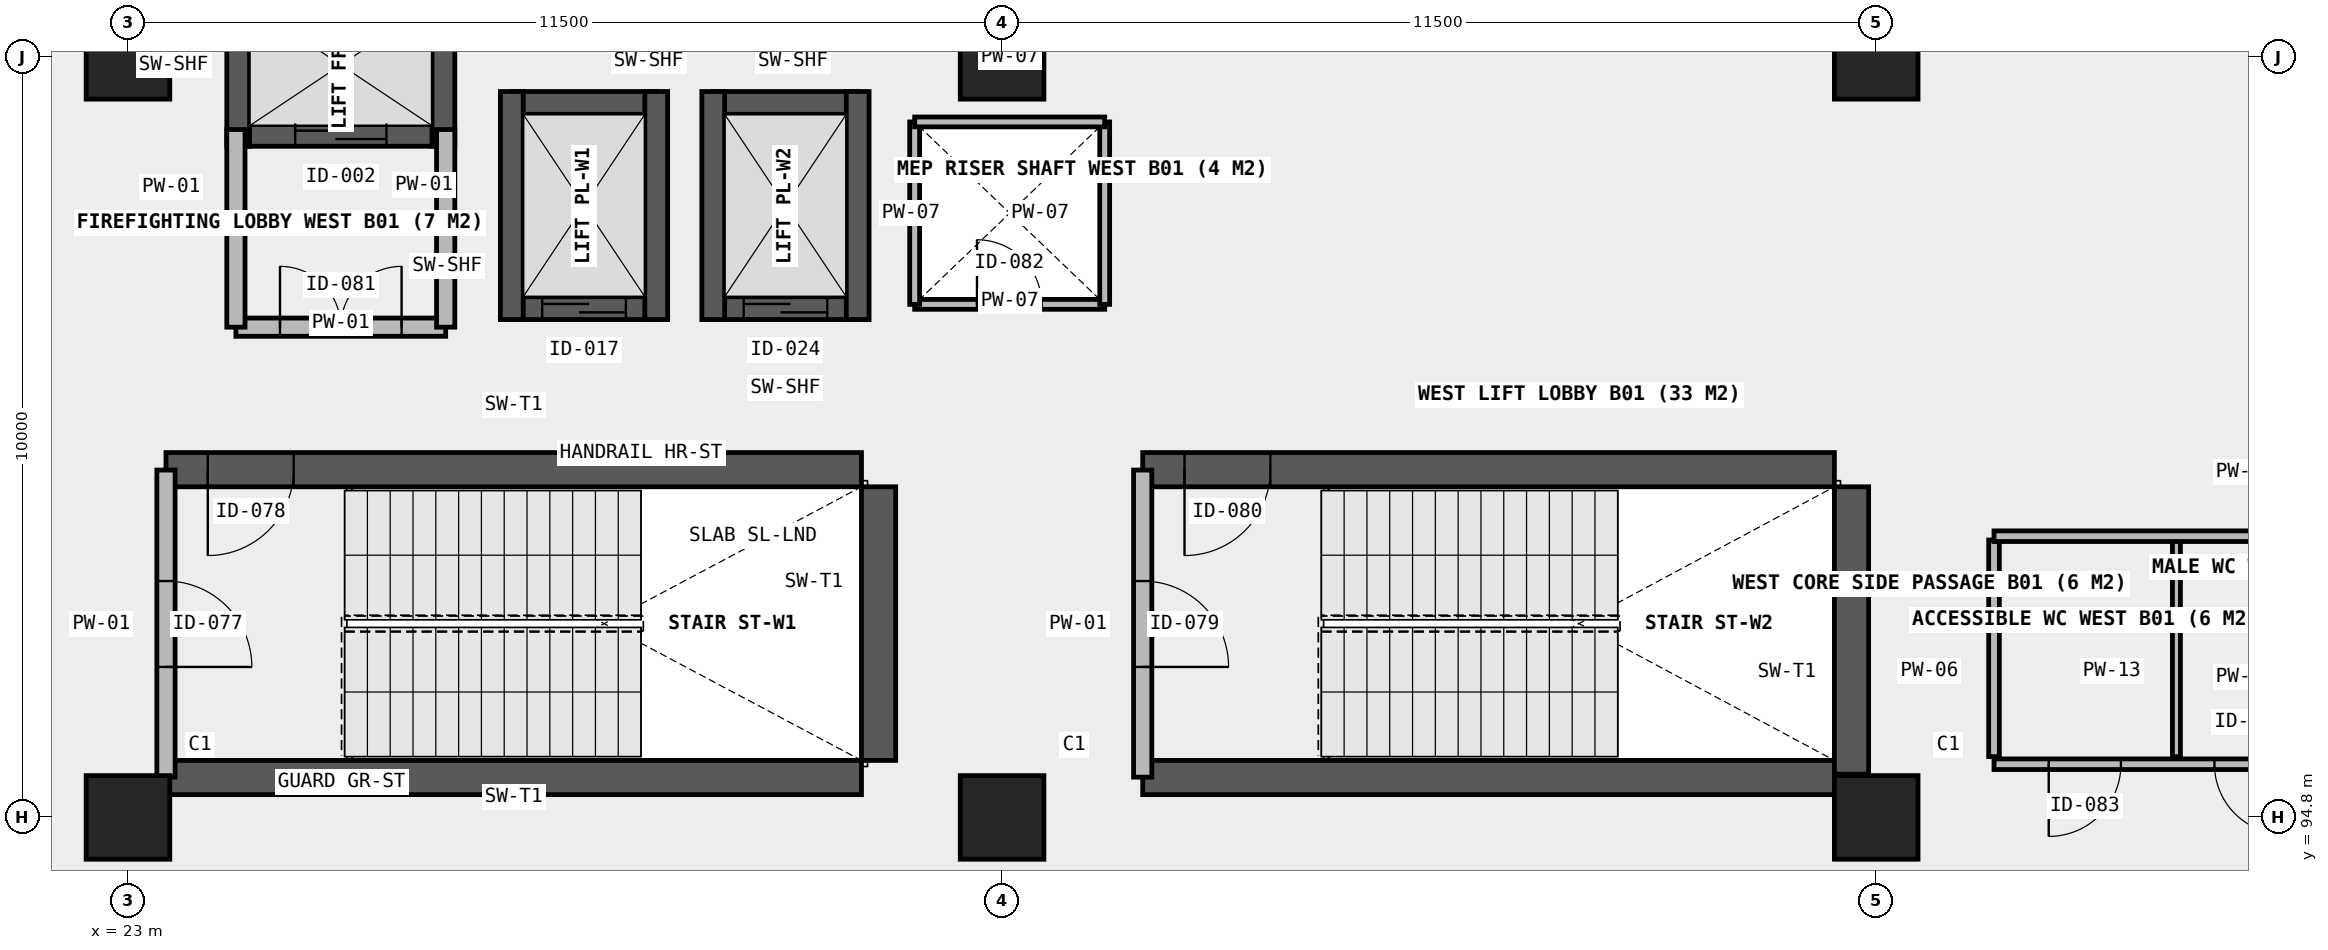
"""IFC4 building model, lengths in metres.
Left out: names, types, materials, properties, quantities, classifications, styles, units other than length and angle.
Written with IfcOpenShell. Run it as: python <this file> out.ifc"""

import sys

from ifc_helpers import new_model, si_unit, direction, frame, frame_2d, origin, origin_2d, place, context, subcontext, project, spatial, rectangle, extrude, element, fill, save


model = new_model("IFC4")
c1 = context("Model", 3, precision=1e-05, world=origin(), true_north=direction((0.0, 1.0)))
c2 = subcontext(c1, "Body", "Model", "MODEL_VIEW")
j1 = project(units=[si_unit("LENGTHUNIT", "METRE"), si_unit("PLANEANGLEUNIT", "RADIAN")], contexts=[c1])
p1 = place(None, origin())
s1 = spatial("IfcSite", under=j1, at=p1, CompositionType="ELEMENT")
p2 = place(p1, origin())
s2 = spatial("IfcBuilding", under=s1, at=p2, CompositionType="ELEMENT")
p3 = place(p2, frame((0.0, 0.0, -4.2)))
s3 = spatial("IfcBuildingStorey", under=s2, at=p3, CompositionType="ELEMENT", Elevation=-4.2)
for number, where, z_axis, x_axis in (
    (1, (23.0, 94.8, 0.0), (0.0, 0.0, 1.0), (1.0, 0.0, 0.0)),
    (2, (23.0, 104.8, 0.0), (0.0, 0.0, 1.0), (1.0, 0.0, 0.0)),
    (3, (34.5, 94.8, 0.0), (0.0, 0.0, 1.0), (1.0, 0.0, 0.0)),
    (4, (34.5, 104.8, 0.0), (0.0, 0.0, 1.0), (1.0, 0.0, 0.0)),
    (5, (46.0, 94.8, 0.0), (0.0, 0.0, 1.0), (1.0, 0.0, 0.0)),
    (6, (46.0, 104.8, 0.0), (0.0, 0.0, 1.0), (1.0, 0.0, 0.0)),
):
    element("IfcColumn", number, at=place(p3, frame(where, z_axis=z_axis, x_axis=x_axis)), inside=s3, PredefinedType="COLUMN", context=c2, shape_type="SweptSolid", body=[
        extrude(rectangle(XDim=1.1, YDim=1.1, at=origin_2d()), origin(), (0.0, 0.0, 1.0), 4.2),
    ])
p4 = place(p3, frame((24.45, 103.78, 0.0), z_axis=(0.0, 0.0, 1.0), x_axis=(1.0, 0.0, 0.0)))
e7 = element("IfcWall", 7, at=p4, inside=s3, PredefinedType="SHEAR", context=c2, shape_type="SweptSolid", body=[
    extrude(rectangle(XDim=2.7, YDim=0.3, at=frame_2d((1.35, 0.0))), origin(), (0.0, 0.0, 1.0), 4.2),
])
p5 = place(p4, frame((0.75, 0.0, 0.0)))
e8 = element("IfcOpeningElement", 8, at=p5, cuts=e7, PredefinedType="OPENING", context=c2, shape_type="SweptSolid", body=[
    extrude(rectangle(XDim=1.2, YDim=2.15, at=frame_2d((0.6, 1.075))), frame((0.0, 0.16, 0.0), z_axis=(0.0, -1.0, 0.0), x_axis=(1.0, 0.0, 0.0)), (0.0, 0.0, 1.0), 0.32),
])
for number, where, z_axis, x_axis in (
    (9, (24.45, 103.63, 0.0), (0.0, 0.0, 1.0), (0.0, 1.0, 0.0)),
    (10, (27.15, 103.63, 0.0), (0.0, 0.0, 1.0), (0.0, 1.0, 0.0)),
):
    element("IfcWall", number, at=place(p3, frame(where, z_axis=z_axis, x_axis=x_axis)), inside=s3, PredefinedType="SHEAR", context=c2, shape_type="SweptSolid", body=[
        extrude(rectangle(XDim=2.14, YDim=0.3, at=frame_2d((1.07, 0.0))), origin(), (0.0, 0.0, 1.0), 4.2),
    ])
p6 = place(p3, frame((28.05, 101.5, 0.0), z_axis=(0.0, 0.0, 1.0), x_axis=(1.0, 0.0, 0.0)))
e11 = element("IfcWall", 11, at=p6, inside=s3, PredefinedType="SHEAR", context=c2, shape_type="SweptSolid", body=[
    extrude(rectangle(XDim=1.9, YDim=0.3, at=frame_2d((0.95, 0.0))), origin(), (0.0, 0.0, 1.0), 4.2),
])
p7 = place(p6, frame((0.4, 0.0, 0.0)))
e12 = element("IfcOpeningElement", 12, at=p7, cuts=e11, PredefinedType="OPENING", context=c2, shape_type="SweptSolid", body=[
    extrude(rectangle(XDim=1.1, YDim=2.15, at=frame_2d((0.55, 1.075))), frame((0.0, 0.16, 0.0), z_axis=(0.0, -1.0, 0.0), x_axis=(1.0, 0.0, 0.0)), (0.0, 0.0, 1.0), 0.32),
])
p8 = place(p3, frame((28.05, 104.2, 0.0), z_axis=(0.0, 0.0, 1.0), x_axis=(1.0, 0.0, 0.0)))
e13 = element("IfcWall", 13, at=p8, inside=s3, PredefinedType="SHEAR", context=c2, shape_type="SweptSolid", body=[
    extrude(rectangle(XDim=1.9, YDim=0.3, at=frame_2d((0.95, 0.0))), origin(), (0.0, 0.0, 1.0), 4.2),
])
for number, where, z_axis, x_axis in (
    (14, (28.05, 101.35, 0.0), (0.0, 0.0, 1.0), (0.0, 1.0, 0.0)),
    (15, (29.95, 101.35, 0.0), (0.0, 0.0, 1.0), (0.0, 1.0, 0.0)),
):
    element("IfcWall", number, at=place(p3, frame(where, z_axis=z_axis, x_axis=x_axis)), inside=s3, PredefinedType="SHEAR", context=c2, shape_type="SweptSolid", body=[
        extrude(rectangle(XDim=3.0, YDim=0.3, at=frame_2d((1.5, 0.0))), origin(), (0.0, 0.0, 1.0), 4.2),
    ])
p9 = place(p3, frame((30.7, 101.5, 0.0), z_axis=(0.0, 0.0, 1.0), x_axis=(1.0, 0.0, 0.0)))
e16 = element("IfcWall", 16, at=p9, inside=s3, PredefinedType="SHEAR", context=c2, shape_type="SweptSolid", body=[
    extrude(rectangle(XDim=1.9, YDim=0.3, at=frame_2d((0.95, 0.0))), origin(), (0.0, 0.0, 1.0), 4.2),
])
p10 = place(p9, frame((0.4, 0.0, 0.0)))
e17 = element("IfcOpeningElement", 17, at=p10, cuts=e16, PredefinedType="OPENING", context=c2, shape_type="SweptSolid", body=[
    extrude(rectangle(XDim=1.1, YDim=2.15, at=frame_2d((0.55, 1.075))), frame((0.0, 0.16, 0.0), z_axis=(0.0, -1.0, 0.0), x_axis=(1.0, 0.0, 0.0)), (0.0, 0.0, 1.0), 0.32),
])
p11 = place(p3, frame((30.7, 104.2, 0.0), z_axis=(0.0, 0.0, 1.0), x_axis=(1.0, 0.0, 0.0)))
e18 = element("IfcWall", 18, at=p11, inside=s3, PredefinedType="SHEAR", context=c2, shape_type="SweptSolid", body=[
    extrude(rectangle(XDim=1.9, YDim=0.3, at=frame_2d((0.95, 0.0))), origin(), (0.0, 0.0, 1.0), 4.2),
])
for number, where, z_axis, x_axis in (
    (19, (30.7, 101.35, 0.0), (0.0, 0.0, 1.0), (0.0, 1.0, 0.0)),
    (20, (32.6, 101.35, 0.0), (0.0, 0.0, 1.0), (0.0, 1.0, 0.0)),
):
    element("IfcWall", number, at=place(p3, frame(where, z_axis=z_axis, x_axis=x_axis)), inside=s3, PredefinedType="SHEAR", context=c2, shape_type="SweptSolid", body=[
        extrude(rectangle(XDim=3.0, YDim=0.3, at=frame_2d((1.5, 0.0))), origin(), (0.0, 0.0, 1.0), 4.2),
    ])
p12 = place(p3, frame((23.5, 95.325, 0.0), z_axis=(0.0, 0.0, 1.0), x_axis=(1.0, 0.0, 0.0)))
e21 = element("IfcWall", 21, at=p12, inside=s3, PredefinedType="SHEAR", context=c2, shape_type="SweptSolid", body=[
    extrude(rectangle(XDim=9.15, YDim=0.45, at=frame_2d((4.575, 0.0))), origin(), (0.0, 0.0, 1.0), 4.2),
])
p13 = place(p3, frame((23.5, 99.375, 0.0), z_axis=(0.0, 0.0, 1.0), x_axis=(1.0, 0.0, 0.0)))
e22 = element("IfcWall", 22, at=p13, inside=s3, PredefinedType="SHEAR", context=c2, shape_type="SweptSolid", body=[
    extrude(rectangle(XDim=9.15, YDim=0.45, at=frame_2d((4.575, 0.0))), origin(), (0.0, 0.0, 1.0), 4.2),
])
p14 = place(p13, frame((0.55, 0.0, 0.0)))
e23 = element("IfcOpeningElement", 23, at=p14, cuts=e22, PredefinedType="OPENING", context=c2, shape_type="SweptSolid", body=[
    extrude(rectangle(XDim=1.13, YDim=2.15, at=frame_2d((0.565, 1.075))), frame((0.0, 0.235, 0.0), z_axis=(0.0, -1.0, 0.0), x_axis=(1.0, 0.0, 0.0)), (0.0, 0.0, 1.0), 0.47),
])
p15 = place(p3, frame((32.875, 95.55, 0.0), z_axis=(0.0, 0.0, 1.0), x_axis=(0.0, 1.0, 0.0)))
e24 = element("IfcWall", 24, at=p15, inside=s3, PredefinedType="SHEAR", context=c2, shape_type="SweptSolid", body=[
    extrude(rectangle(XDim=3.6, YDim=0.45, at=frame_2d((1.8, 0.0))), origin(), (0.0, 0.0, 1.0), 4.2),
])
p16 = place(p3, frame((36.35, 95.325, 0.0), z_axis=(0.0, 0.0, 1.0), x_axis=(1.0, 0.0, 0.0)))
e25 = element("IfcWall", 25, at=p16, inside=s3, PredefinedType="SHEAR", context=c2, shape_type="SweptSolid", body=[
    extrude(rectangle(XDim=9.1, YDim=0.45, at=frame_2d((4.55, 0.0))), origin(), (0.0, 0.0, 1.0), 4.2),
])
p17 = place(p3, frame((36.35, 99.375, 0.0), z_axis=(0.0, 0.0, 1.0), x_axis=(1.0, 0.0, 0.0)))
e26 = element("IfcWall", 26, at=p17, inside=s3, PredefinedType="SHEAR", context=c2, shape_type="SweptSolid", body=[
    extrude(rectangle(XDim=9.1, YDim=0.45, at=frame_2d((4.55, 0.0))), origin(), (0.0, 0.0, 1.0), 4.2),
])
p18 = place(p17, frame((0.55, 0.0, 0.0)))
e27 = element("IfcOpeningElement", 27, at=p18, cuts=e26, PredefinedType="OPENING", context=c2, shape_type="SweptSolid", body=[
    extrude(rectangle(XDim=1.13, YDim=2.15, at=frame_2d((0.565, 1.075))), frame((0.0, 0.235, 0.0), z_axis=(0.0, -1.0, 0.0), x_axis=(1.0, 0.0, 0.0)), (0.0, 0.0, 1.0), 0.47),
])
p19 = place(p3, frame((45.675, 95.37, 0.0), z_axis=(0.0, 0.0, 1.0), x_axis=(0.0, 1.0, 0.0)))
e28 = element("IfcWall", 28, at=p19, inside=s3, PredefinedType="SHEAR", context=c2, shape_type="SweptSolid", body=[
    extrude(rectangle(XDim=3.78, YDim=0.45, at=frame_2d((1.89, 0.0))), origin(), (0.0, 0.0, 1.0), 4.2),
])
p20 = place(p3, frame((23.5, 95.33, 0.0), z_axis=(0.0, 0.0, 1.0), x_axis=(0.0, 1.0, 0.0)))
e29 = element("IfcWall", 29, at=p20, inside=s3, PredefinedType="SOLIDWALL", context=c2, shape_type="SweptSolid", body=[
    extrude(rectangle(XDim=4.04, YDim=0.24, at=frame_2d((2.02, 0.0))), origin(), (0.0, 0.0, 1.0), 3.86),
])
p21 = place(p20, frame((1.45, 0.0, 0.0)))
e30 = element("IfcOpeningElement", 30, at=p21, cuts=e29, PredefinedType="OPENING", context=c2, shape_type="SweptSolid", body=[
    extrude(rectangle(XDim=1.13, YDim=2.15, at=frame_2d((0.565, 1.075))), frame((0.0, 0.13, 0.0), z_axis=(0.0, -1.0, 0.0), x_axis=(1.0, 0.0, 0.0)), (0.0, 0.0, 1.0), 0.26),
])
p22 = place(p3, frame((36.35, 95.33, 0.0), z_axis=(0.0, 0.0, 1.0), x_axis=(0.0, 1.0, 0.0)))
e31 = element("IfcWall", 31, at=p22, inside=s3, PredefinedType="SOLIDWALL", context=c2, shape_type="SweptSolid", body=[
    extrude(rectangle(XDim=4.04, YDim=0.24, at=frame_2d((2.02, 0.0))), origin(), (0.0, 0.0, 1.0), 3.86),
])
p23 = place(p22, frame((1.45, 0.0, 0.0)))
e32 = element("IfcOpeningElement", 32, at=p23, cuts=e31, PredefinedType="OPENING", context=c2, shape_type="SweptSolid", body=[
    extrude(rectangle(XDim=1.13, YDim=2.15, at=frame_2d((0.565, 1.075))), frame((0.0, 0.13, 0.0), z_axis=(0.0, -1.0, 0.0), x_axis=(1.0, 0.0, 0.0)), (0.0, 0.0, 1.0), 0.26),
])
p24 = place(p3, frame((24.42, 101.25, 0.0), z_axis=(0.0, 0.0, 1.0), x_axis=(1.0, 0.0, 0.0)))
e33 = element("IfcWall", 33, at=p24, inside=s3, PredefinedType="SOLIDWALL", context=c2, shape_type="SweptSolid", body=[
    extrude(rectangle(XDim=2.76, YDim=0.24, at=frame_2d((1.38, 0.0))), origin(), (0.0, 0.0, 1.0), 3.86),
])
p25 = place(p24, frame((0.58, 0.0, 0.0)))
e34 = element("IfcOpeningElement", 34, at=p25, cuts=e33, PredefinedType="OPENING", context=c2, shape_type="SweptSolid", body=[
    extrude(rectangle(XDim=1.6, YDim=2.15, at=frame_2d((0.8, 1.075))), frame((0.0, 0.13, 0.0), z_axis=(0.0, -1.0, 0.0), x_axis=(1.0, 0.0, 0.0)), (0.0, 0.0, 1.0), 0.26),
])
for number, where, z_axis, x_axis in (
    (35, (24.42, 101.25, 0.0), (0.0, 0.0, 1.0), (0.0, 1.0, 0.0)),
    (36, (27.18, 101.25, 0.0), (0.0, 0.0, 1.0), (0.0, 1.0, 0.0)),
):
    element("IfcWall", number, at=place(p3, frame(where, z_axis=z_axis, x_axis=x_axis)), inside=s3, PredefinedType="SOLIDWALL", context=c2, shape_type="SweptSolid", body=[
        extrude(rectangle(XDim=2.6, YDim=0.24, at=frame_2d((1.3, 0.0))), origin(), (0.0, 0.0, 1.0), 3.86),
    ])
p26 = place(p3, frame((33.35, 101.55, 0.0), z_axis=(0.0, 0.0, 1.0), x_axis=(1.0, 0.0, 0.0)))
e37 = element("IfcWall", 37, at=p26, inside=s3, PredefinedType="PLUMBINGWALL", context=c2, shape_type="SweptSolid", body=[
    extrude(rectangle(XDim=2.5, YDim=0.13, at=frame_2d((1.25, 0.0))), origin(), (0.0, 0.0, 1.0), 3.86),
])
p27 = place(p26, frame((0.82, 0.0, 0.0)))
e38 = element("IfcOpeningElement", 38, at=p27, cuts=e37, PredefinedType="OPENING", context=c2, shape_type="SweptSolid", body=[
    extrude(rectangle(XDim=0.85, YDim=2.0, at=frame_2d((0.425, 1.0))), frame((0.0, 0.075, 0.0), z_axis=(0.0, -1.0, 0.0), x_axis=(1.0, 0.0, 0.0)), (0.0, 0.0, 1.0), 0.15),
])
for number, where, z_axis, x_axis in (
    (39, (33.35, 101.55, 0.0), (0.0, 0.0, 1.0), (0.0, 1.0, 0.0)),
    (40, (35.85, 101.55, 0.0), (0.0, 0.0, 1.0), (0.0, 1.0, 0.0)),
):
    element("IfcWall", number, at=place(p3, frame(where, z_axis=z_axis, x_axis=x_axis)), inside=s3, PredefinedType="PLUMBINGWALL", context=c2, shape_type="SweptSolid", body=[
        extrude(rectangle(XDim=2.4, YDim=0.13, at=frame_2d((1.2, 0.0))), origin(), (0.0, 0.0, 1.0), 3.86),
    ])
p28 = place(p3, frame((33.35, 103.95, 0.0), z_axis=(0.0, 0.0, 1.0), x_axis=(1.0, 0.0, 0.0)))
e41 = element("IfcWall", 41, at=p28, inside=s3, PredefinedType="PLUMBINGWALL", context=c2, shape_type="SweptSolid", body=[
    extrude(rectangle(XDim=2.5, YDim=0.13, at=frame_2d((1.25, 0.0))), origin(), (0.0, 0.0, 1.0), 3.86),
])
p29 = place(p3, frame((47.55, 95.5, 0.0), z_axis=(0.0, 0.0, 1.0), x_axis=(1.0, 0.0, 0.0)))
e42 = element("IfcWall", 42, at=p29, inside=s3, PredefinedType="PLUMBINGWALL", context=c2, shape_type="SweptSolid", body=[
    extrude(rectangle(XDim=6.6, YDim=0.14, at=frame_2d((3.3, 0.0))), origin(), (0.0, 0.0, 1.0), 3.86),
])
p30 = place(p29, frame((0.72, 0.0, 0.0)))
e43 = element("IfcOpeningElement", 43, at=p30, cuts=e42, PredefinedType="OPENING", context=c2, shape_type="SweptSolid", body=[
    extrude(rectangle(XDim=0.95, YDim=2.1, at=frame_2d((0.475, 1.05))), frame((0.0, 0.08, 0.0), z_axis=(0.0, -1.0, 0.0), x_axis=(1.0, 0.0, 0.0)), (0.0, 0.0, 1.0), 0.16),
])
p31 = place(p29, frame((2.9, 0.0, 0.0)))
e44 = element("IfcOpeningElement", 44, at=p31, cuts=e42, PredefinedType="OPENING", context=c2, shape_type="SweptSolid", body=[
    extrude(rectangle(XDim=0.92, YDim=2.1, at=frame_2d((0.46, 1.05))), frame((0.0, 0.08, 0.0), z_axis=(0.0, -1.0, 0.0), x_axis=(1.0, 0.0, 0.0)), (0.0, 0.0, 1.0), 0.16),
])
p32 = place(p29, frame((5.0, 0.0, 0.0)))
e45 = element("IfcOpeningElement", 45, at=p32, cuts=e42, PredefinedType="OPENING", context=c2, shape_type="SweptSolid", body=[
    extrude(rectangle(XDim=0.92, YDim=2.1, at=frame_2d((0.46, 1.05))), frame((0.0, 0.08, 0.0), z_axis=(0.0, -1.0, 0.0), x_axis=(1.0, 0.0, 0.0)), (0.0, 0.0, 1.0), 0.16),
])
p33 = place(p3, frame((47.55, 95.6, 0.0), z_axis=(0.0, 0.0, 1.0), x_axis=(0.0, 1.0, 0.0)))
e46 = element("IfcWall", 46, at=p33, inside=s3, PredefinedType="PLUMBINGWALL", context=c2, shape_type="SweptSolid", body=[
    extrude(rectangle(XDim=2.85, YDim=0.14, at=frame_2d((1.425, 0.0))), origin(), (0.0, 0.0, 1.0), 3.86),
])
p34 = place(p3, frame((49.95, 95.6, 0.0), z_axis=(0.0, 0.0, 1.0), x_axis=(0.0, 1.0, 0.0)))
e47 = element("IfcWall", 47, at=p34, inside=s3, PredefinedType="PARTITIONING", context=c2, shape_type="SweptSolid", body=[
    extrude(rectangle(XDim=2.85, YDim=0.105, at=frame_2d((1.425, 0.0))), origin(), (0.0, 0.0, 1.0), 3.33),
])
p35 = place(p3, frame((47.55, 98.5, 0.0), z_axis=(0.0, 0.0, 1.0), x_axis=(1.0, 0.0, 0.0)))
e48 = element("IfcWall", 48, at=p35, inside=s3, PredefinedType="PLUMBINGWALL", context=c2, shape_type="SweptSolid", body=[
    extrude(rectangle(XDim=6.6, YDim=0.14, at=frame_2d((3.3, 0.0))), origin(), (0.0, 0.0, 1.0), 3.86),
])
p36 = place(p5, origin())
e49 = element("IfcDoor", 49, at=p36, inside=s3, OperationType="SLIDING_TO_RIGHT", PredefinedType="DOOR", context=c2, shape_type="SweptSolid", body=[
    extrude(rectangle(XDim=1.2, YDim=2.15, at=frame_2d((0.6, 1.075))), frame((0.0, 0.025, 0.0), z_axis=(0.0, -1.0, 0.0), x_axis=(1.0, 0.0, 0.0)), (0.0, 0.0, 1.0), 0.05),
])
fill(e8, e49)
p37 = place(p7, origin())
e50 = element("IfcDoor", 50, at=p37, inside=s3, OperationType="SLIDING_TO_LEFT", PredefinedType="DOOR", context=c2, shape_type="SweptSolid", body=[
    extrude(rectangle(XDim=1.1, YDim=2.15, at=frame_2d((0.55, 1.075))), frame((0.0, 0.025, 0.0), z_axis=(0.0, -1.0, 0.0), x_axis=(1.0, 0.0, 0.0)), (0.0, 0.0, 1.0), 0.05),
])
fill(e12, e50)
p38 = place(p10, origin())
e51 = element("IfcDoor", 51, at=p38, inside=s3, OperationType="SLIDING_TO_LEFT", PredefinedType="DOOR", context=c2, shape_type="SweptSolid", body=[
    extrude(rectangle(XDim=1.1, YDim=2.15, at=frame_2d((0.55, 1.075))), frame((0.0, 0.025, 0.0), z_axis=(0.0, -1.0, 0.0), x_axis=(1.0, 0.0, 0.0)), (0.0, 0.0, 1.0), 0.05),
])
fill(e17, e51)
p39 = place(p21, frame((0.565, 0.0, 0.0), z_axis=(0.0, 0.0, 1.0), x_axis=(-1.0, 0.0, 0.0)))
e52 = element("IfcDoor", 52, at=p39, inside=s3, OperationType="SINGLE_SWING_LEFT", PredefinedType="DOOR", context=c2, shape_type="SweptSolid", body=[
    extrude(rectangle(XDim=1.13, YDim=2.15, at=frame_2d((0.0, 1.075))), frame((0.0, 0.025, 0.0), z_axis=(0.0, -1.0, 0.0), x_axis=(1.0, 0.0, 0.0)), (0.0, 0.0, 1.0), 0.05),
])
fill(e30, e52)
p40 = place(p14, frame((0.565, 0.0, 0.0), z_axis=(0.0, 0.0, 1.0), x_axis=(-1.0, 0.0, 0.0)))
e53 = element("IfcDoor", 53, at=p40, inside=s3, OperationType="SINGLE_SWING_LEFT", PredefinedType="DOOR", context=c2, shape_type="SweptSolid", body=[
    extrude(rectangle(XDim=1.13, YDim=2.15, at=frame_2d((0.0, 1.075))), frame((0.0, 0.025, 0.0), z_axis=(0.0, -1.0, 0.0), x_axis=(1.0, 0.0, 0.0)), (0.0, 0.0, 1.0), 0.05),
])
fill(e23, e53)
p41 = place(p23, frame((0.565, 0.0, 0.0), z_axis=(0.0, 0.0, 1.0), x_axis=(-1.0, 0.0, 0.0)))
e54 = element("IfcDoor", 54, at=p41, inside=s3, OperationType="SINGLE_SWING_LEFT", PredefinedType="DOOR", context=c2, shape_type="SweptSolid", body=[
    extrude(rectangle(XDim=1.13, YDim=2.15, at=frame_2d((0.0, 1.075))), frame((0.0, 0.025, 0.0), z_axis=(0.0, -1.0, 0.0), x_axis=(1.0, 0.0, 0.0)), (0.0, 0.0, 1.0), 0.05),
])
fill(e32, e54)
p42 = place(p18, frame((0.565, 0.0, 0.0), z_axis=(0.0, 0.0, 1.0), x_axis=(-1.0, 0.0, 0.0)))
e55 = element("IfcDoor", 55, at=p42, inside=s3, OperationType="SINGLE_SWING_LEFT", PredefinedType="DOOR", context=c2, shape_type="SweptSolid", body=[
    extrude(rectangle(XDim=1.13, YDim=2.15, at=frame_2d((0.0, 1.075))), frame((0.0, 0.025, 0.0), z_axis=(0.0, -1.0, 0.0), x_axis=(1.0, 0.0, 0.0)), (0.0, 0.0, 1.0), 0.05),
])
fill(e27, e55)
p43 = place(p25, origin())
e56 = element("IfcDoor", 56, at=p43, inside=s3, OperationType="DOUBLE_DOOR_SINGLE_SWING", PredefinedType="DOOR", context=c2, shape_type="SweptSolid", body=[
    extrude(rectangle(XDim=1.6, YDim=2.15, at=frame_2d((0.8, 1.075))), frame((0.0, 0.025, 0.0), z_axis=(0.0, -1.0, 0.0), x_axis=(1.0, 0.0, 0.0)), (0.0, 0.0, 1.0), 0.05),
])
fill(e34, e56)
p44 = place(p27, origin())
e57 = element("IfcDoor", 57, at=p44, inside=s3, OperationType="SINGLE_SWING_LEFT", PredefinedType="TRAPDOOR", context=c2, shape_type="SweptSolid", body=[
    extrude(rectangle(XDim=0.85, YDim=2.0, at=frame_2d((0.425, 1.0))), frame((0.0, 0.025, 0.0), z_axis=(0.0, -1.0, 0.0), x_axis=(1.0, 0.0, 0.0)), (0.0, 0.0, 1.0), 0.05),
])
fill(e38, e57)
p45 = place(p30, frame((0.475, 0.0, 0.0), z_axis=(0.0, 0.0, 1.0), x_axis=(-1.0, 0.0, 0.0)))
e58 = element("IfcDoor", 58, at=p45, inside=s3, OperationType="SINGLE_SWING_LEFT", PredefinedType="DOOR", context=c2, shape_type="SweptSolid", body=[
    extrude(rectangle(XDim=0.95, YDim=2.1, at=frame_2d((0.0, 1.05))), frame((0.0, 0.025, 0.0), z_axis=(0.0, -1.0, 0.0), x_axis=(1.0, 0.0, 0.0)), (0.0, 0.0, 1.0), 0.05),
])
fill(e43, e58)
p46 = place(p31, origin())
e59 = element("IfcDoor", 59, at=p46, inside=s3, OperationType="SINGLE_SWING_RIGHT", PredefinedType="DOOR", context=c2, shape_type="SweptSolid", body=[
    extrude(rectangle(XDim=0.92, YDim=2.1, at=frame_2d((0.46, 1.05))), frame((0.0, 0.025, 0.0), z_axis=(0.0, -1.0, 0.0), x_axis=(1.0, 0.0, 0.0)), (0.0, 0.0, 1.0), 0.05),
])
fill(e44, e59)
save(model, sys.argv[1])
